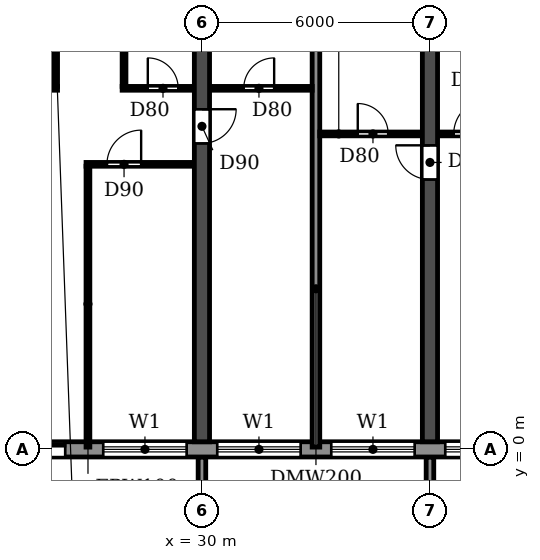
"""IFC4 building model, lengths in metres.
Left out: names, types, materials, properties, quantities, classifications, styles, units other than length and angle.
Written with IfcOpenShell. Run it as: python <this file> out.ifc"""

import sys

from ifc_helpers import new_model, si_unit, direction, frame, frame_2d, origin, place, context, subcontext, project, spatial, polyline, rectangle, outline, extrude, source, transform, mapped, element, fill, save


model = new_model("IFC4")
c1 = context("Model", 3, precision=1e-05, world=origin(), true_north=direction((0.0, 1.0)))
c2 = subcontext(c1, "Body", "Model", "MODEL_VIEW")
j1 = project(units=[si_unit("LENGTHUNIT", "METRE"), si_unit("PLANEANGLEUNIT", "RADIAN")], contexts=[c1])
p1 = place(None, origin())
s1 = spatial("IfcSite", under=j1, at=p1, CompositionType="ELEMENT")
p2 = place(p1, origin())
s2 = spatial("IfcBuilding", under=s1, at=p2, CompositionType="ELEMENT")
p3 = place(p2, frame((0.0, 0.0, 49.8)))
s3 = spatial("IfcBuildingStorey", under=s2, at=p3, CompositionType="ELEMENT", Elevation=49.8)
p4 = place(p3, frame((30.0, 0.2, 0.0), z_axis=(0.0, 0.0, 1.0), x_axis=(0.0, 1.0, 0.0)))
e1 = element("IfcWall", 1, at=p4, inside=s3, PredefinedType="SHEAR", context=c2, shape_type="SweptSolid", body=[
    extrude(rectangle(XDim=11.65, YDim=0.4, at=frame_2d((5.825, 0.0))), origin(), (0.0, 0.0, 1.0), 3.0),
])
p5 = place(p4, frame((7.85, 0.0, 0.0)))
e2 = element("IfcOpeningElement", 2, at=p5, cuts=e1, PredefinedType="OPENING", context=c2, shape_type="SweptSolid", body=[
    extrude(rectangle(XDim=0.9, YDim=2.1, at=frame_2d((0.45, 1.05))), frame((0.0, 0.21, 0.0), z_axis=(0.0, -1.0, 0.0), x_axis=(1.0, 0.0, 0.0)), (0.0, 0.0, 1.0), 0.42),
])
p6 = place(p3, frame((36.0, 0.2, 0.0), z_axis=(0.0, 0.0, 1.0), x_axis=(0.0, 1.0, 0.0)))
e3 = element("IfcWall", 3, at=p6, inside=s3, PredefinedType="SHEAR", context=c2, shape_type="SweptSolid", body=[
    extrude(rectangle(XDim=11.65, YDim=0.4, at=frame_2d((5.825, 0.0))), origin(), (0.0, 0.0, 1.0), 3.0),
])
p7 = place(p6, frame((6.9, 0.0, 0.0)))
e4 = element("IfcOpeningElement", 4, at=p7, cuts=e3, PredefinedType="OPENING", context=c2, shape_type="SweptSolid", body=[
    extrude(rectangle(XDim=0.9, YDim=2.1, at=frame_2d((0.45, 1.05))), frame((0.0, 0.21, 0.0), z_axis=(0.0, -1.0, 0.0), x_axis=(1.0, 0.0, 0.0)), (0.0, 0.0, 1.0), 0.42),
])
p8 = place(p3, frame((4.683, 0.0, 0.0), z_axis=(0.0, 0.0, 1.0), x_axis=(1.0, 0.0, 0.0)))
e5 = element("IfcWall", 5, at=p8, inside=s3, PredefinedType="STANDARD", context=c2, shape_type="SweptSolid", body=[
    extrude(rectangle(XDim=92.634, YDim=0.4, at=frame_2d((46.317, 0.0))), origin(), (0.0, 0.0, 1.0), 3.0),
])
p9 = place(p8, frame((1.717, 0.0, 0.9)))
e6 = element("IfcOpeningElement", 6, at=p9, cuts=e5, PredefinedType="OPENING", context=c2, shape_type="SweptSolid", body=[
    extrude(rectangle(XDim=2.2, YDim=1.5, at=frame_2d((1.1, 0.75))), frame((0.0, 0.21, 0.0), z_axis=(0.0, -1.0, 0.0), x_axis=(1.0, 0.0, 0.0)), (0.0, 0.0, 1.0), 0.42),
])
p10 = place(p8, frame((4.717, 0.0, 0.9)))
e7 = element("IfcOpeningElement", 7, at=p10, cuts=e5, PredefinedType="OPENING", context=c2, shape_type="SweptSolid", body=[
    extrude(rectangle(XDim=2.2, YDim=1.5, at=frame_2d((1.1, 0.75))), frame((0.0, 0.21, 0.0), z_axis=(0.0, -1.0, 0.0), x_axis=(1.0, 0.0, 0.0)), (0.0, 0.0, 1.0), 0.42),
])
p11 = place(p8, frame((7.717, 0.0, 0.9)))
e8 = element("IfcOpeningElement", 8, at=p11, cuts=e5, PredefinedType="OPENING", context=c2, shape_type="SweptSolid", body=[
    extrude(rectangle(XDim=2.2, YDim=1.5, at=frame_2d((1.1, 0.75))), frame((0.0, 0.21, 0.0), z_axis=(0.0, -1.0, 0.0), x_axis=(1.0, 0.0, 0.0)), (0.0, 0.0, 1.0), 0.42),
])
p12 = place(p8, frame((10.917, 0.0, 0.0)))
e9 = element("IfcOpeningElement", 9, at=p12, cuts=e5, PredefinedType="OPENING", context=c2, shape_type="SweptSolid", body=[
    extrude(rectangle(XDim=1.8, YDim=2.4, at=frame_2d((0.9, 1.2))), frame((0.0, 0.21, 0.0), z_axis=(0.0, -1.0, 0.0), x_axis=(1.0, 0.0, 0.0)), (0.0, 0.0, 1.0), 0.42),
])
p13 = place(p8, frame((13.717, 0.0, 0.9)))
e10 = element("IfcOpeningElement", 10, at=p13, cuts=e5, PredefinedType="OPENING", context=c2, shape_type="SweptSolid", body=[
    extrude(rectangle(XDim=2.2, YDim=1.5, at=frame_2d((1.1, 0.75))), frame((0.0, 0.21, 0.0), z_axis=(0.0, -1.0, 0.0), x_axis=(1.0, 0.0, 0.0)), (0.0, 0.0, 1.0), 0.42),
])
p14 = place(p8, frame((16.717, 0.0, 0.9)))
e11 = element("IfcOpeningElement", 11, at=p14, cuts=e5, PredefinedType="OPENING", context=c2, shape_type="SweptSolid", body=[
    extrude(rectangle(XDim=2.2, YDim=1.5, at=frame_2d((1.1, 0.75))), frame((0.0, 0.21, 0.0), z_axis=(0.0, -1.0, 0.0), x_axis=(1.0, 0.0, 0.0)), (0.0, 0.0, 1.0), 0.42),
])
p15 = place(p8, frame((19.917, 0.0, 0.0)))
e12 = element("IfcOpeningElement", 12, at=p15, cuts=e5, PredefinedType="OPENING", context=c2, shape_type="SweptSolid", body=[
    extrude(rectangle(XDim=1.8, YDim=2.4, at=frame_2d((0.9, 1.2))), frame((0.0, 0.21, 0.0), z_axis=(0.0, -1.0, 0.0), x_axis=(1.0, 0.0, 0.0)), (0.0, 0.0, 1.0), 0.42),
])
p16 = place(p8, frame((22.717, 0.0, 0.9)))
e13 = element("IfcOpeningElement", 13, at=p16, cuts=e5, PredefinedType="OPENING", context=c2, shape_type="SweptSolid", body=[
    extrude(rectangle(XDim=2.2, YDim=1.5, at=frame_2d((1.1, 0.75))), frame((0.0, 0.21, 0.0), z_axis=(0.0, -1.0, 0.0), x_axis=(1.0, 0.0, 0.0)), (0.0, 0.0, 1.0), 0.42),
])
p17 = place(p8, frame((25.717, 0.0, 0.9)))
e14 = element("IfcOpeningElement", 14, at=p17, cuts=e5, PredefinedType="OPENING", context=c2, shape_type="SweptSolid", body=[
    extrude(rectangle(XDim=2.2, YDim=1.5, at=frame_2d((1.1, 0.75))), frame((0.0, 0.21, 0.0), z_axis=(0.0, -1.0, 0.0), x_axis=(1.0, 0.0, 0.0)), (0.0, 0.0, 1.0), 0.42),
])
p18 = place(p8, frame((28.717, 0.0, 0.9)))
e15 = element("IfcOpeningElement", 15, at=p18, cuts=e5, PredefinedType="OPENING", context=c2, shape_type="SweptSolid", body=[
    extrude(rectangle(XDim=2.2, YDim=1.5, at=frame_2d((1.1, 0.75))), frame((0.0, 0.21, 0.0), z_axis=(0.0, -1.0, 0.0), x_axis=(1.0, 0.0, 0.0)), (0.0, 0.0, 1.0), 0.42),
])
p19 = place(p8, frame((31.717, 0.0, 0.9)))
e16 = element("IfcOpeningElement", 16, at=p19, cuts=e5, PredefinedType="OPENING", context=c2, shape_type="SweptSolid", body=[
    extrude(rectangle(XDim=2.2, YDim=1.5, at=frame_2d((1.1, 0.75))), frame((0.0, 0.21, 0.0), z_axis=(0.0, -1.0, 0.0), x_axis=(1.0, 0.0, 0.0)), (0.0, 0.0, 1.0), 0.42),
])
p20 = place(p8, frame((34.917, 0.0, 0.0)))
e17 = element("IfcOpeningElement", 17, at=p20, cuts=e5, PredefinedType="OPENING", context=c2, shape_type="SweptSolid", body=[
    extrude(rectangle(XDim=1.8, YDim=2.4, at=frame_2d((0.9, 1.2))), frame((0.0, 0.21, 0.0), z_axis=(0.0, -1.0, 0.0), x_axis=(1.0, 0.0, 0.0)), (0.0, 0.0, 1.0), 0.42),
])
p21 = place(p8, frame((37.717, 0.0, 0.9)))
e18 = element("IfcOpeningElement", 18, at=p21, cuts=e5, PredefinedType="OPENING", context=c2, shape_type="SweptSolid", body=[
    extrude(rectangle(XDim=2.2, YDim=1.5, at=frame_2d((1.1, 0.75))), frame((0.0, 0.21, 0.0), z_axis=(0.0, -1.0, 0.0), x_axis=(1.0, 0.0, 0.0)), (0.0, 0.0, 1.0), 0.42),
])
p22 = place(p8, frame((40.717, 0.0, 0.9)))
e19 = element("IfcOpeningElement", 19, at=p22, cuts=e5, PredefinedType="OPENING", context=c2, shape_type="SweptSolid", body=[
    extrude(rectangle(XDim=2.2, YDim=1.5, at=frame_2d((1.1, 0.75))), frame((0.0, 0.21, 0.0), z_axis=(0.0, -1.0, 0.0), x_axis=(1.0, 0.0, 0.0)), (0.0, 0.0, 1.0), 0.42),
])
p23 = place(p8, frame((43.717, 0.0, 0.9)))
e20 = element("IfcOpeningElement", 20, at=p23, cuts=e5, PredefinedType="OPENING", context=c2, shape_type="SweptSolid", body=[
    extrude(rectangle(XDim=2.2, YDim=1.5, at=frame_2d((1.1, 0.75))), frame((0.0, 0.21, 0.0), z_axis=(0.0, -1.0, 0.0), x_axis=(1.0, 0.0, 0.0)), (0.0, 0.0, 1.0), 0.42),
])
p24 = place(p8, frame((46.917, 0.0, 0.0)))
e21 = element("IfcOpeningElement", 21, at=p24, cuts=e5, PredefinedType="OPENING", context=c2, shape_type="SweptSolid", body=[
    extrude(rectangle(XDim=1.8, YDim=2.4, at=frame_2d((0.9, 1.2))), frame((0.0, 0.21, 0.0), z_axis=(0.0, -1.0, 0.0), x_axis=(1.0, 0.0, 0.0)), (0.0, 0.0, 1.0), 0.42),
])
p25 = place(p8, frame((49.717, 0.0, 0.9)))
e22 = element("IfcOpeningElement", 22, at=p25, cuts=e5, PredefinedType="OPENING", context=c2, shape_type="SweptSolid", body=[
    extrude(rectangle(XDim=2.2, YDim=1.5, at=frame_2d((1.1, 0.75))), frame((0.0, 0.21, 0.0), z_axis=(0.0, -1.0, 0.0), x_axis=(1.0, 0.0, 0.0)), (0.0, 0.0, 1.0), 0.42),
])
p26 = place(p8, frame((52.717, 0.0, 0.9)))
e23 = element("IfcOpeningElement", 23, at=p26, cuts=e5, PredefinedType="OPENING", context=c2, shape_type="SweptSolid", body=[
    extrude(rectangle(XDim=2.2, YDim=1.5, at=frame_2d((1.1, 0.75))), frame((0.0, 0.21, 0.0), z_axis=(0.0, -1.0, 0.0), x_axis=(1.0, 0.0, 0.0)), (0.0, 0.0, 1.0), 0.42),
])
p27 = place(p8, frame((55.717, 0.0, 0.9)))
e24 = element("IfcOpeningElement", 24, at=p27, cuts=e5, PredefinedType="OPENING", context=c2, shape_type="SweptSolid", body=[
    extrude(rectangle(XDim=2.2, YDim=1.5, at=frame_2d((1.1, 0.75))), frame((0.0, 0.21, 0.0), z_axis=(0.0, -1.0, 0.0), x_axis=(1.0, 0.0, 0.0)), (0.0, 0.0, 1.0), 0.42),
])
p28 = place(p8, frame((58.917, 0.0, 0.0)))
e25 = element("IfcOpeningElement", 25, at=p28, cuts=e5, PredefinedType="OPENING", context=c2, shape_type="SweptSolid", body=[
    extrude(rectangle(XDim=1.8, YDim=2.4, at=frame_2d((0.9, 1.2))), frame((0.0, 0.21, 0.0), z_axis=(0.0, -1.0, 0.0), x_axis=(1.0, 0.0, 0.0)), (0.0, 0.0, 1.0), 0.42),
])
p29 = place(p8, frame((61.717, 0.0, 0.9)))
e26 = element("IfcOpeningElement", 26, at=p29, cuts=e5, PredefinedType="OPENING", context=c2, shape_type="SweptSolid", body=[
    extrude(rectangle(XDim=2.2, YDim=1.5, at=frame_2d((1.1, 0.75))), frame((0.0, 0.21, 0.0), z_axis=(0.0, -1.0, 0.0), x_axis=(1.0, 0.0, 0.0)), (0.0, 0.0, 1.0), 0.42),
])
p30 = place(p8, frame((64.717, 0.0, 0.9)))
e27 = element("IfcOpeningElement", 27, at=p30, cuts=e5, PredefinedType="OPENING", context=c2, shape_type="SweptSolid", body=[
    extrude(rectangle(XDim=2.2, YDim=1.5, at=frame_2d((1.1, 0.75))), frame((0.0, 0.21, 0.0), z_axis=(0.0, -1.0, 0.0), x_axis=(1.0, 0.0, 0.0)), (0.0, 0.0, 1.0), 0.42),
])
p31 = place(p8, frame((67.717, 0.0, 0.9)))
e28 = element("IfcOpeningElement", 28, at=p31, cuts=e5, PredefinedType="OPENING", context=c2, shape_type="SweptSolid", body=[
    extrude(rectangle(XDim=2.2, YDim=1.5, at=frame_2d((1.1, 0.75))), frame((0.0, 0.21, 0.0), z_axis=(0.0, -1.0, 0.0), x_axis=(1.0, 0.0, 0.0)), (0.0, 0.0, 1.0), 0.42),
])
p32 = place(p8, frame((70.917, 0.0, 0.0)))
e29 = element("IfcOpeningElement", 29, at=p32, cuts=e5, PredefinedType="OPENING", context=c2, shape_type="SweptSolid", body=[
    extrude(rectangle(XDim=1.8, YDim=2.4, at=frame_2d((0.9, 1.2))), frame((0.0, 0.21, 0.0), z_axis=(0.0, -1.0, 0.0), x_axis=(1.0, 0.0, 0.0)), (0.0, 0.0, 1.0), 0.42),
])
p33 = place(p8, frame((73.717, 0.0, 0.9)))
e30 = element("IfcOpeningElement", 30, at=p33, cuts=e5, PredefinedType="OPENING", context=c2, shape_type="SweptSolid", body=[
    extrude(rectangle(XDim=2.2, YDim=1.5, at=frame_2d((1.1, 0.75))), frame((0.0, 0.21, 0.0), z_axis=(0.0, -1.0, 0.0), x_axis=(1.0, 0.0, 0.0)), (0.0, 0.0, 1.0), 0.42),
])
p34 = place(p8, frame((76.717, 0.0, 0.9)))
e31 = element("IfcOpeningElement", 31, at=p34, cuts=e5, PredefinedType="OPENING", context=c2, shape_type="SweptSolid", body=[
    extrude(rectangle(XDim=2.2, YDim=1.5, at=frame_2d((1.1, 0.75))), frame((0.0, 0.21, 0.0), z_axis=(0.0, -1.0, 0.0), x_axis=(1.0, 0.0, 0.0)), (0.0, 0.0, 1.0), 0.42),
])
p35 = place(p8, frame((79.717, 0.0, 0.9)))
e32 = element("IfcOpeningElement", 32, at=p35, cuts=e5, PredefinedType="OPENING", context=c2, shape_type="SweptSolid", body=[
    extrude(rectangle(XDim=2.2, YDim=1.5, at=frame_2d((1.1, 0.75))), frame((0.0, 0.21, 0.0), z_axis=(0.0, -1.0, 0.0), x_axis=(1.0, 0.0, 0.0)), (0.0, 0.0, 1.0), 0.42),
])
p36 = place(p8, frame((82.917, 0.0, 0.0)))
e33 = element("IfcOpeningElement", 33, at=p36, cuts=e5, PredefinedType="OPENING", context=c2, shape_type="SweptSolid", body=[
    extrude(rectangle(XDim=1.8, YDim=2.4, at=frame_2d((0.9, 1.2))), frame((0.0, 0.21, 0.0), z_axis=(0.0, -1.0, 0.0), x_axis=(1.0, 0.0, 0.0)), (0.0, 0.0, 1.0), 0.42),
])
p37 = place(p8, frame((85.717, 0.0, 0.9)))
e34 = element("IfcOpeningElement", 34, at=p37, cuts=e5, PredefinedType="OPENING", context=c2, shape_type="SweptSolid", body=[
    extrude(rectangle(XDim=2.2, YDim=1.5, at=frame_2d((1.1, 0.75))), frame((0.0, 0.21, 0.0), z_axis=(0.0, -1.0, 0.0), x_axis=(1.0, 0.0, 0.0)), (0.0, 0.0, 1.0), 0.42),
])
p38 = place(p8, frame((88.717, 0.0, 0.9)))
e35 = element("IfcOpeningElement", 35, at=p38, cuts=e5, PredefinedType="OPENING", context=c2, shape_type="SweptSolid", body=[
    extrude(rectangle(XDim=2.2, YDim=1.5, at=frame_2d((1.1, 0.75))), frame((0.0, 0.21, 0.0), z_axis=(0.0, -1.0, 0.0), x_axis=(1.0, 0.0, 0.0)), (0.0, 0.0, 1.0), 0.42),
])
m1 = source(origin(), c2, "Body", "SweptSolid", [
    extrude(outline(polyline([(0.0, 0.0), (0.2, 0.0), (0.2, 1.65), (0.0, 1.65), (0.0, 0.0)])), origin(), (0.0, 0.0, 1.0), 3.1),
])
for number, where in (
    (36, (29.9, -1.85, 0.0)),
    (37, (35.9, -1.85, 0.0)),
):
    element("IfcWall", number, at=place(p3, frame(where)), inside=s3, PredefinedType="STANDARD", context=c2, shape_type="MappedRepresentation", body=[
        mapped(m1, transform((0.0, 0.0, 0.0))),
    ])
p39 = place(p3, frame((33.0, 0.06, 0.0), z_axis=(0.0, 0.0, 1.0), x_axis=(0.0, 1.0, 0.0)))
e38 = element("IfcWall", 38, at=p39, inside=s3, PredefinedType="PARTITIONING", context=c2, shape_type="SweptSolid", body=[
    extrude(rectangle(XDim=11.78, YDim=0.2, at=frame_2d((5.89, 0.0))), origin(), (0.0, 0.0, 1.0), 3.0),
])
p40 = place(p3, frame((26.95, 7.5, 0.0), z_axis=(0.0, 0.0, 1.0), x_axis=(1.0, 0.0, 0.0)))
e39 = element("IfcWall", 39, at=p40, inside=s3, PredefinedType="PARTITIONING", context=c2, shape_type="SweptSolid", body=[
    extrude(rectangle(XDim=2.84, YDim=0.1, at=frame_2d((1.42, 0.0))), origin(), (0.0, 0.0, 1.0), 3.0),
])
p41 = place(p40, frame((0.55, 0.0, 0.0)))
e40 = element("IfcOpeningElement", 40, at=p41, cuts=e39, PredefinedType="OPENING", context=c2, shape_type="SweptSolid", body=[
    extrude(rectangle(XDim=0.9, YDim=2.1, at=frame_2d((0.45, 1.05))), frame((0.0, 0.06, 0.0), z_axis=(0.0, -1.0, 0.0), x_axis=(1.0, 0.0, 0.0)), (0.0, 0.0, 1.0), 0.12),
])
p42 = place(p3, frame((33.1, 8.3, 0.0), z_axis=(0.0, 0.0, 1.0), x_axis=(1.0, 0.0, 0.0)))
e41 = element("IfcWall", 41, at=p42, inside=s3, PredefinedType="PARTITIONING", context=c2, shape_type="SweptSolid", body=[
    extrude(rectangle(XDim=2.69, YDim=0.1, at=frame_2d((1.345, 0.0))), origin(), (0.0, 0.0, 1.0), 3.0),
])
p43 = place(p42, frame((1.0, 0.0, 0.0)))
e42 = element("IfcOpeningElement", 42, at=p43, cuts=e41, PredefinedType="OPENING", context=c2, shape_type="SweptSolid", body=[
    extrude(rectangle(XDim=0.8, YDim=2.1, at=frame_2d((0.4, 1.05))), frame((0.0, 0.06, 0.0), z_axis=(0.0, -1.0, 0.0), x_axis=(1.0, 0.0, 0.0)), (0.0, 0.0, 1.0), 0.12),
])
p44 = place(p3, frame((36.21, 8.3, 0.0), z_axis=(0.0, 0.0, 1.0), x_axis=(1.0, 0.0, 0.0)))
e43 = element("IfcWall", 43, at=p44, inside=s3, PredefinedType="PARTITIONING", context=c2, shape_type="SweptSolid", body=[
    extrude(rectangle(XDim=1.99, YDim=0.1, at=frame_2d((0.995, 0.0))), origin(), (0.0, 0.0, 1.0), 3.0),
])
p45 = place(p44, frame((0.415, 0.0, 0.0)))
e44 = element("IfcOpeningElement", 44, at=p45, cuts=e43, PredefinedType="OPENING", context=c2, shape_type="SweptSolid", body=[
    extrude(rectangle(XDim=0.9, YDim=2.1, at=frame_2d((0.45, 1.05))), frame((0.0, 0.06, 0.0), z_axis=(0.0, -1.0, 0.0), x_axis=(1.0, 0.0, 0.0)), (0.0, 0.0, 1.0), 0.12),
])
p46 = place(p3, frame((24.21, 9.5, 0.0), z_axis=(0.0, 0.0, 1.0), x_axis=(1.0, 0.0, 0.0)))
e45 = element("IfcWall", 45, at=p46, inside=s3, PredefinedType="PARTITIONING", context=c2, shape_type="SweptSolid", body=[
    extrude(rectangle(XDim=1.99, YDim=0.1, at=frame_2d((0.995, 0.0))), origin(), (0.0, 0.0, 1.0), 3.0),
])
p47 = place(p46, frame((0.415, 0.0, 0.0)))
e46 = element("IfcOpeningElement", 46, at=p47, cuts=e45, PredefinedType="OPENING", context=c2, shape_type="SweptSolid", body=[
    extrude(rectangle(XDim=0.9, YDim=2.1, at=frame_2d((0.45, 1.05))), frame((0.0, 0.06, 0.0), z_axis=(0.0, -1.0, 0.0), x_axis=(1.0, 0.0, 0.0)), (0.0, 0.0, 1.0), 0.12),
])
p48 = place(p3, frame((27.9, 9.5, 0.0), z_axis=(0.0, 0.0, 1.0), x_axis=(1.0, 0.0, 0.0)))
e47 = element("IfcWall", 47, at=p48, inside=s3, PredefinedType="PARTITIONING", context=c2, shape_type="SweptSolid", body=[
    extrude(rectangle(XDim=1.89, YDim=0.1, at=frame_2d((0.945, 0.0))), origin(), (0.0, 0.0, 1.0), 3.0),
])
p49 = place(p48, frame((0.675, 0.0, 0.0)))
e48 = element("IfcOpeningElement", 48, at=p49, cuts=e47, PredefinedType="OPENING", context=c2, shape_type="SweptSolid", body=[
    extrude(rectangle(XDim=0.8, YDim=2.1, at=frame_2d((0.4, 1.05))), frame((0.0, 0.06, 0.0), z_axis=(0.0, -1.0, 0.0), x_axis=(1.0, 0.0, 0.0)), (0.0, 0.0, 1.0), 0.12),
])
p50 = place(p3, frame((30.21, 9.5, 0.0), z_axis=(0.0, 0.0, 1.0), x_axis=(1.0, 0.0, 0.0)))
e49 = element("IfcWall", 49, at=p50, inside=s3, PredefinedType="PARTITIONING", context=c2, shape_type="SweptSolid", body=[
    extrude(rectangle(XDim=2.69, YDim=0.1, at=frame_2d((1.345, 0.0))), origin(), (0.0, 0.0, 1.0), 3.0),
])
p51 = place(p50, frame((0.89, 0.0, 0.0)))
e50 = element("IfcOpeningElement", 50, at=p51, cuts=e49, PredefinedType="OPENING", context=c2, shape_type="SweptSolid", body=[
    extrude(rectangle(XDim=0.8, YDim=2.1, at=frame_2d((0.4, 1.05))), frame((0.0, 0.06, 0.0), z_axis=(0.0, -1.0, 0.0), x_axis=(1.0, 0.0, 0.0)), (0.0, 0.0, 1.0), 0.12),
])
p52 = place(p3, frame((26.15, 9.55, 0.0), z_axis=(0.0, 0.0, 1.0), x_axis=(0.0, 1.0, 0.0)))
e51 = element("IfcWall", 51, at=p52, inside=s3, PredefinedType="PARTITIONING", context=c2, shape_type="SweptSolid", body=[
    extrude(rectangle(XDim=2.29, YDim=0.1, at=frame_2d((1.145, 0.0))), origin(), (0.0, 0.0, 1.0), 3.0),
])
p53 = place(p3, frame((27.0, 0.06, 0.0), z_axis=(0.0, 0.0, 1.0), x_axis=(0.0, 1.0, 0.0)))
e52 = element("IfcWall", 52, at=p53, inside=s3, PredefinedType="PARTITIONING", context=c2, shape_type="SweptSolid", body=[
    extrude(rectangle(XDim=7.39, YDim=0.1, at=frame_2d((3.695, 0.0))), origin(), (0.0, 0.0, 1.0), 3.0),
])
p54 = place(p3, frame((27.95, 9.55, 0.0), z_axis=(0.0, 0.0, 1.0), x_axis=(0.0, 1.0, 0.0)))
e53 = element("IfcWall", 53, at=p54, inside=s3, PredefinedType="PARTITIONING", context=c2, shape_type="SweptSolid", body=[
    extrude(rectangle(XDim=2.29, YDim=0.1, at=frame_2d((1.145, 0.0))), origin(), (0.0, 0.0, 1.0), 3.0),
])
p55 = place(p15, origin())
e54 = element("IfcDoor", 54, at=p55, inside=s3, OperationType="DOUBLE_DOOR_SLIDING", PredefinedType="DOOR", context=c2, shape_type="SweptSolid", body=[
    extrude(rectangle(XDim=1.8, YDim=2.4, at=frame_2d((0.9, 1.2))), frame((0.0, 0.025, 0.0), z_axis=(0.0, -1.0, 0.0), x_axis=(1.0, 0.0, 0.0)), (0.0, 0.0, 1.0), 0.05),
])
fill(e12, e54)
p56 = place(p16, origin())
e55 = element("IfcWindow", 55, at=p56, inside=s3, PartitioningType="DOUBLE_PANEL_HORIZONTAL", PredefinedType="WINDOW", context=c2, shape_type="SweptSolid", body=[
    extrude(rectangle(XDim=2.2, YDim=1.5, at=frame_2d((1.1, 0.75))), frame((0.0, 0.03, 0.0), z_axis=(0.0, -1.0, 0.0), x_axis=(1.0, 0.0, 0.0)), (0.0, 0.0, 1.0), 0.06),
])
fill(e13, e55)
p57 = place(p17, origin())
e56 = element("IfcWindow", 56, at=p57, inside=s3, PartitioningType="DOUBLE_PANEL_HORIZONTAL", PredefinedType="WINDOW", context=c2, shape_type="SweptSolid", body=[
    extrude(rectangle(XDim=2.2, YDim=1.5, at=frame_2d((1.1, 0.75))), frame((0.0, 0.03, 0.0), z_axis=(0.0, -1.0, 0.0), x_axis=(1.0, 0.0, 0.0)), (0.0, 0.0, 1.0), 0.06),
])
fill(e14, e56)
p58 = place(p18, origin())
e57 = element("IfcWindow", 57, at=p58, inside=s3, PartitioningType="DOUBLE_PANEL_HORIZONTAL", PredefinedType="WINDOW", context=c2, shape_type="SweptSolid", body=[
    extrude(rectangle(XDim=2.2, YDim=1.5, at=frame_2d((1.1, 0.75))), frame((0.0, 0.03, 0.0), z_axis=(0.0, -1.0, 0.0), x_axis=(1.0, 0.0, 0.0)), (0.0, 0.0, 1.0), 0.06),
])
fill(e15, e57)
p59 = place(p19, origin())
e58 = element("IfcWindow", 58, at=p59, inside=s3, PartitioningType="DOUBLE_PANEL_HORIZONTAL", PredefinedType="WINDOW", context=c2, shape_type="SweptSolid", body=[
    extrude(rectangle(XDim=2.2, YDim=1.5, at=frame_2d((1.1, 0.75))), frame((0.0, 0.03, 0.0), z_axis=(0.0, -1.0, 0.0), x_axis=(1.0, 0.0, 0.0)), (0.0, 0.0, 1.0), 0.06),
])
fill(e16, e58)
p60 = place(p51, origin())
e59 = element("IfcDoor", 59, at=p60, inside=s3, OperationType="SINGLE_SWING_RIGHT", PredefinedType="DOOR", context=c2, shape_type="SweptSolid", body=[
    extrude(rectangle(XDim=0.8, YDim=2.1, at=frame_2d((0.4, 1.05))), frame((0.0, 0.025, 0.0), z_axis=(0.0, -1.0, 0.0), x_axis=(1.0, 0.0, 0.0)), (0.0, 0.0, 1.0), 0.05),
])
fill(e50, e59)
p61 = place(p41, origin())
e60 = element("IfcDoor", 60, at=p61, inside=s3, OperationType="SINGLE_SWING_RIGHT", PredefinedType="DOOR", context=c2, shape_type="SweptSolid", body=[
    extrude(rectangle(XDim=0.9, YDim=2.1, at=frame_2d((0.45, 1.05))), frame((0.0, 0.025, 0.0), z_axis=(0.0, -1.0, 0.0), x_axis=(1.0, 0.0, 0.0)), (0.0, 0.0, 1.0), 0.05),
])
fill(e40, e60)
p62 = place(p49, origin())
e61 = element("IfcDoor", 61, at=p62, inside=s3, OperationType="SINGLE_SWING_LEFT", PredefinedType="DOOR", context=c2, shape_type="SweptSolid", body=[
    extrude(rectangle(XDim=0.8, YDim=2.1, at=frame_2d((0.4, 1.05))), frame((0.0, 0.025, 0.0), z_axis=(0.0, -1.0, 0.0), x_axis=(1.0, 0.0, 0.0)), (0.0, 0.0, 1.0), 0.05),
])
fill(e48, e61)
p63 = place(p5, frame((0.9, 0.0, 0.0), z_axis=(0.0, 0.0, 1.0), x_axis=(-1.0, 0.0, 0.0)))
e62 = element("IfcDoor", 62, at=p63, inside=s3, OperationType="SINGLE_SWING_LEFT", PredefinedType="DOOR", context=c2, shape_type="SweptSolid", body=[
    extrude(rectangle(XDim=0.9, YDim=2.1, at=frame_2d((0.45, 1.05))), frame((0.0, 0.025, 0.0), z_axis=(0.0, -1.0, 0.0), x_axis=(1.0, 0.0, 0.0)), (0.0, 0.0, 1.0), 0.05),
])
fill(e2, e62)
p64 = place(p43, origin())
e63 = element("IfcDoor", 63, at=p64, inside=s3, OperationType="SINGLE_SWING_LEFT", PredefinedType="DOOR", context=c2, shape_type="SweptSolid", body=[
    extrude(rectangle(XDim=0.8, YDim=2.1, at=frame_2d((0.4, 1.05))), frame((0.0, 0.025, 0.0), z_axis=(0.0, -1.0, 0.0), x_axis=(1.0, 0.0, 0.0)), (0.0, 0.0, 1.0), 0.05),
])
fill(e42, e63)
p65 = place(p7, origin())
e64 = element("IfcDoor", 64, at=p65, inside=s3, OperationType="SINGLE_SWING_RIGHT", PredefinedType="DOOR", context=c2, shape_type="SweptSolid", body=[
    extrude(rectangle(XDim=0.9, YDim=2.1, at=frame_2d((0.45, 1.05))), frame((0.0, 0.025, 0.0), z_axis=(0.0, -1.0, 0.0), x_axis=(1.0, 0.0, 0.0)), (0.0, 0.0, 1.0), 0.05),
])
fill(e4, e64)
p66 = place(p45, origin())
e65 = element("IfcDoor", 65, at=p66, inside=s3, OperationType="SINGLE_SWING_RIGHT", PredefinedType="DOOR", context=c2, shape_type="SweptSolid", body=[
    extrude(rectangle(XDim=0.9, YDim=2.1, at=frame_2d((0.45, 1.05))), frame((0.0, 0.025, 0.0), z_axis=(0.0, -1.0, 0.0), x_axis=(1.0, 0.0, 0.0)), (0.0, 0.0, 1.0), 0.05),
])
fill(e44, e65)
save(model, sys.argv[1])
